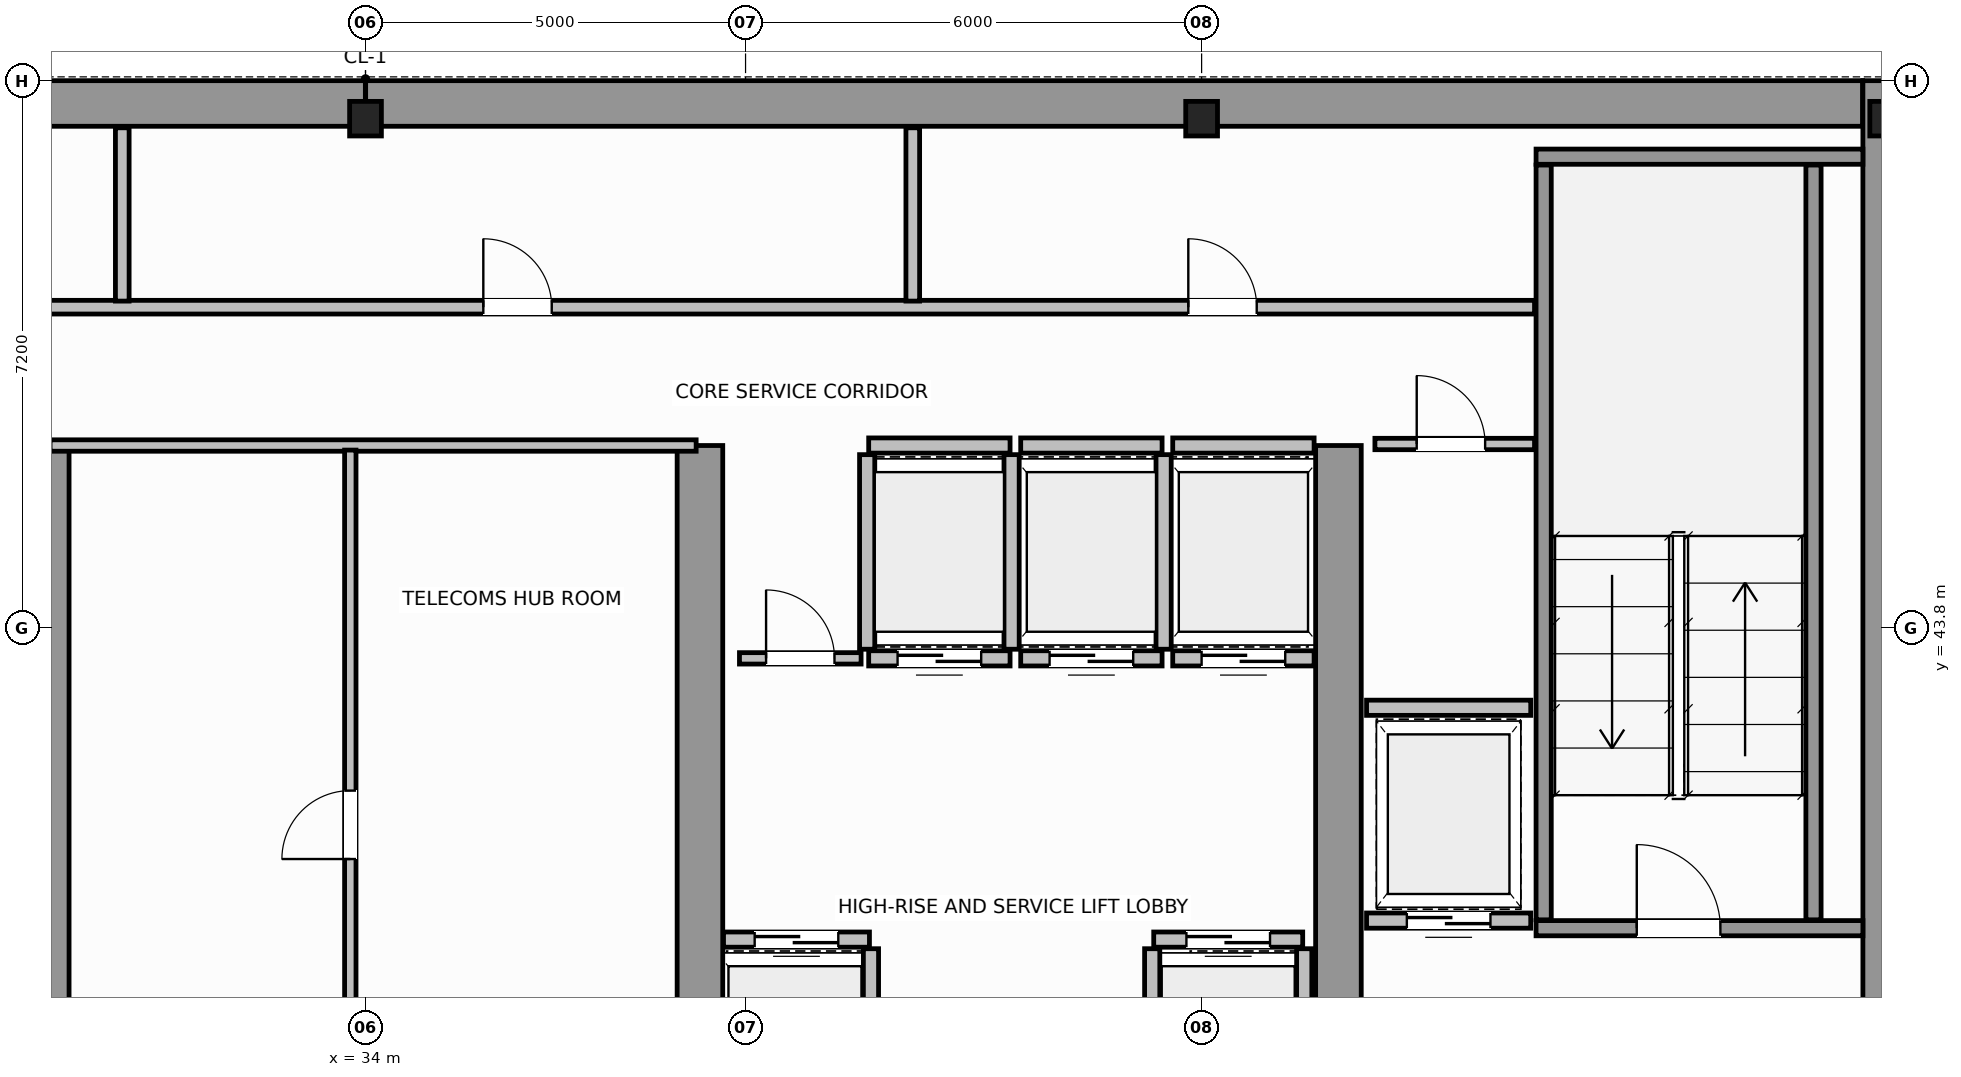
"""IFC4 building model, lengths in metres.
Left out: names, types, materials, properties, quantities, classifications, styles, units other than length and angle.
Written with IfcOpenShell. Run it as: python <this file> out.ifc"""

import sys

from ifc_helpers import new_model, si_unit, direction, frame, frame_2d, origin, origin_2d, place, context, subcontext, project, spatial, rectangle, i_section, extrude, source, transform, mapped, element, fill, save


model = new_model("IFC4")
c1 = context("Model", 3, precision=1e-05, world=origin(), true_north=direction((0.0, 1.0)))
c2 = subcontext(c1, "Body", "Model", "MODEL_VIEW")
j1 = project(units=[si_unit("LENGTHUNIT", "METRE"), si_unit("PLANEANGLEUNIT", "RADIAN")], contexts=[c1])
p1 = place(None, origin())
s1 = spatial("IfcSite", under=j1, at=p1, CompositionType="ELEMENT")
p2 = place(p1, origin())
s2 = spatial("IfcBuilding", under=s1, at=p2, CompositionType="ELEMENT")
p3 = place(p2, frame((0.0, 0.0, 223.2)))
s3 = spatial("IfcBuildingStorey", under=s2, at=p3, CompositionType="ELEMENT", Elevation=223.2)
m1 = source(origin(), c2, "Body", "SweptSolid", [
    extrude(i_section(OverallWidth=0.418, OverallDepth=0.455, WebThickness=0.042, FlangeThickness=0.058, FilletRadius=0.015, at=origin_2d()), origin(), (0.0, 0.0, 1.0), 3.8),
])
for number, where, z_axis, x_axis in (
    (1, (34.0, 50.5, 0.0), (0.0, 0.0, 1.0), (1.0, 0.0, 0.0)),
    (2, (45.0, 50.5, 0.0), (0.0, 0.0, 1.0), (1.0, 0.0, 0.0)),
    (3, (54.0, 50.5, 0.0), (0.0, 0.0, 1.0), (1.0, 0.0, 0.0)),
):
    element("IfcColumn", number, at=place(p3, frame(where, z_axis=z_axis, x_axis=x_axis)), inside=s3, PredefinedType="COLUMN", context=c2, shape_type="MappedRepresentation", body=[
        mapped(m1, transform((0.0, 0.0, 0.0), scale=1.0)),
    ])
for number, where, z_axis, x_axis in (
    (4, (14.304, 50.7, 0.0), (0.0, 0.0, 1.0), (1.0, 0.0, 0.0)),
    (5, (34.002, 50.7, 0.0), (0.0, 0.0, 1.0), (1.0, 0.0, 0.0)),
):
    element("IfcWall", number, at=place(p3, frame(where, z_axis=z_axis, x_axis=x_axis)), inside=s3, PredefinedType="SHEAR", context=c2, shape_type="SweptSolid", body=[
        extrude(rectangle(XDim=19.694, YDim=0.6, at=frame_2d((9.847, 0.0))), origin(), (0.0, 0.0, 1.0), 3.8),
    ])
p4 = place(p3, frame((54.0, 36.5, 0.0), z_axis=(0.0, 0.0, 1.0), x_axis=(0.0, 1.0, 0.0)))
e6 = element("IfcWall", 6, at=p4, inside=s3, PredefinedType="SHEAR", context=c2, shape_type="SweptSolid", body=[
    extrude(rectangle(XDim=14.5, YDim=0.6, at=frame_2d((7.25, 0.0))), origin(), (0.0, 0.0, 1.0), 3.8),
])
for number, where, z_axis, x_axis in (
    (7, (29.8, 36.82, 0.0), (0.0, 0.0, 1.0), (0.0, 1.0, 0.0)),
    (8, (38.4, 36.82, 0.0), (0.0, 0.0, 1.0), (0.0, 1.0, 0.0)),
    (9, (46.8, 36.82, 0.0), (0.0, 0.0, 1.0), (0.0, 1.0, 0.0)),
):
    element("IfcWall", number, at=place(p3, frame(where, z_axis=z_axis, x_axis=x_axis)), inside=s3, PredefinedType="SHEAR", context=c2, shape_type="SweptSolid", body=[
        extrude(rectangle(XDim=9.38, YDim=0.6, at=frame_2d((4.69, 0.0))), origin(), (0.0, 0.0, 1.0), 3.8),
    ])
p5 = place(p3, frame((49.4, 39.85, 0.0), z_axis=(0.0, 0.0, 1.0), x_axis=(1.0, 0.0, 0.0)))
e10 = element("IfcWall", 10, at=p5, inside=s3, PredefinedType="SOLIDWALL", context=c2, shape_type="SweptSolid", body=[
    extrude(rectangle(XDim=4.3, YDim=0.2, at=frame_2d((2.15, 0.0))), origin(), (0.0, 0.0, 1.0), 3.8),
])
p6 = place(p5, frame((1.325, 0.0, 0.0)))
e11 = element("IfcOpeningElement", 11, at=p6, cuts=e10, PredefinedType="OPENING", context=c2, shape_type="SweptSolid", body=[
    extrude(rectangle(XDim=1.1, YDim=2.15, at=frame_2d((0.55, 1.075))), frame((0.0, 0.11, 0.0), z_axis=(0.0, -1.0, 0.0), x_axis=(1.0, 0.0, 0.0)), (0.0, 0.0, 1.0), 0.22),
])
p7 = place(p3, frame((49.4, 50.0, 0.0), z_axis=(0.0, 0.0, 1.0), x_axis=(1.0, 0.0, 0.0)))
e12 = element("IfcWall", 12, at=p7, inside=s3, PredefinedType="SOLIDWALL", context=c2, shape_type="SweptSolid", body=[
    extrude(rectangle(XDim=4.3, YDim=0.2, at=frame_2d((2.15, 0.0))), origin(), (0.0, 0.0, 1.0), 3.8),
])
for number, where, z_axis, x_axis in (
    (13, (49.5, 39.96, 0.0), (0.0, 0.0, 1.0), (0.0, 1.0, 0.0)),
    (14, (53.05, 39.96, 0.0), (0.0, 0.0, 1.0), (0.0, 1.0, 0.0)),
):
    element("IfcWall", number, at=place(p3, frame(where, z_axis=z_axis, x_axis=x_axis)), inside=s3, PredefinedType="SOLIDWALL", context=c2, shape_type="SweptSolid", body=[
        extrude(rectangle(XDim=9.93, YDim=0.2, at=frame_2d((4.965, 0.0))), origin(), (0.0, 0.0, 1.0), 3.8),
    ])
p8 = place(p3, frame((38.71, 39.7, 0.0), z_axis=(0.0, 0.0, 1.0), x_axis=(1.0, 0.0, 0.0)))
e15 = element("IfcWall", 15, at=p8, inside=s3, PredefinedType="SOLIDWALL", context=c2, shape_type="SweptSolid", body=[
    extrude(rectangle(XDim=1.92, YDim=0.2, at=frame_2d((0.96, 0.0))), origin(), (0.0, 0.0, 1.0), 3.58),
])
p9 = place(p8, frame((0.41, 0.0, 0.0)))
e16 = element("IfcOpeningElement", 16, at=p9, cuts=e15, PredefinedType="OPENING", context=c2, shape_type="SweptSolid", body=[
    extrude(rectangle(XDim=1.1, YDim=2.15, at=frame_2d((0.55, 1.075))), frame((0.0, 0.11, 0.0), z_axis=(0.0, -1.0, 0.0), x_axis=(1.0, 0.0, 0.0)), (0.0, 0.0, 1.0), 0.22),
])
p10 = place(p3, frame((40.65, 37.02, 0.0), z_axis=(0.0, 0.0, 1.0), x_axis=(0.0, 1.0, 0.0)))
e17 = element("IfcWall", 17, at=p10, inside=s3, PredefinedType="SOLIDWALL", context=c2, shape_type="SweptSolid", body=[
    extrude(rectangle(XDim=2.56, YDim=0.2, at=frame_2d((1.28, 0.0))), origin(), (0.0, 0.0, 1.0), 3.58),
])
p11 = place(p3, frame((44.37, 39.7, 0.0), z_axis=(0.0, 0.0, 1.0), x_axis=(1.0, 0.0, 0.0)))
e18 = element("IfcWall", 18, at=p11, inside=s3, PredefinedType="SOLIDWALL", context=c2, shape_type="SweptSolid", body=[
    extrude(rectangle(XDim=1.96, YDim=0.2, at=frame_2d((0.98, 0.0))), origin(), (0.0, 0.0, 1.0), 3.58),
])
p12 = place(p11, frame((0.43, 0.0, 0.0)))
e19 = element("IfcOpeningElement", 19, at=p12, cuts=e18, PredefinedType="OPENING", context=c2, shape_type="SweptSolid", body=[
    extrude(rectangle(XDim=1.1, YDim=2.15, at=frame_2d((0.55, 1.075))), frame((0.0, 0.11, 0.0), z_axis=(0.0, -1.0, 0.0), x_axis=(1.0, 0.0, 0.0)), (0.0, 0.0, 1.0), 0.22),
])
for number, where, z_axis, x_axis in (
    (20, (44.35, 37.02, 0.0), (0.0, 0.0, 1.0), (0.0, 1.0, 0.0)),
    (21, (46.35, 37.02, 0.0), (0.0, 0.0, 1.0), (0.0, 1.0, 0.0)),
):
    element("IfcWall", number, at=place(p3, frame(where, z_axis=z_axis, x_axis=x_axis)), inside=s3, PredefinedType="SOLIDWALL", context=c2, shape_type="SweptSolid", body=[
        extrude(rectangle(XDim=2.56, YDim=0.2, at=frame_2d((1.28, 0.0))), origin(), (0.0, 0.0, 1.0), 3.58),
    ])
p13 = place(p3, frame((40.62, 43.4, 0.0), z_axis=(0.0, 0.0, 1.0), x_axis=(1.0, 0.0, 0.0)))
e22 = element("IfcWall", 22, at=p13, inside=s3, PredefinedType="SOLIDWALL", context=c2, shape_type="SweptSolid", body=[
    extrude(rectangle(XDim=1.86, YDim=0.2, at=frame_2d((0.93, 0.0))), origin(), (0.0, 0.0, 1.0), 3.58),
])
p14 = place(p13, frame((0.38, 0.0, 0.0)))
e23 = element("IfcOpeningElement", 23, at=p14, cuts=e22, PredefinedType="OPENING", context=c2, shape_type="SweptSolid", body=[
    extrude(rectangle(XDim=1.1, YDim=2.15, at=frame_2d((0.55, 1.075))), frame((0.0, 0.11, 0.0), z_axis=(0.0, -1.0, 0.0), x_axis=(1.0, 0.0, 0.0)), (0.0, 0.0, 1.0), 0.22),
])
p15 = place(p3, frame((40.62, 46.2, 0.0), z_axis=(0.0, 0.0, 1.0), x_axis=(1.0, 0.0, 0.0)))
e24 = element("IfcWall", 24, at=p15, inside=s3, PredefinedType="SOLIDWALL", context=c2, shape_type="SweptSolid", body=[
    extrude(rectangle(XDim=1.86, YDim=0.2, at=frame_2d((0.93, 0.0))), origin(), (0.0, 0.0, 1.0), 3.58),
])
for number, where, z_axis, x_axis in (
    (25, (40.6, 43.52, 0.0), (0.0, 0.0, 1.0), (0.0, 1.0, 0.0)),
    (26, (42.5, 43.52, 0.0), (0.0, 0.0, 1.0), (0.0, 1.0, 0.0)),
):
    element("IfcWall", number, at=place(p3, frame(where, z_axis=z_axis, x_axis=x_axis)), inside=s3, PredefinedType="SOLIDWALL", context=c2, shape_type="SweptSolid", body=[
        extrude(rectangle(XDim=2.56, YDim=0.2, at=frame_2d((1.28, 0.0))), origin(), (0.0, 0.0, 1.0), 3.58),
    ])
p16 = place(p3, frame((42.62, 43.4, 0.0), z_axis=(0.0, 0.0, 1.0), x_axis=(1.0, 0.0, 0.0)))
e27 = element("IfcWall", 27, at=p16, inside=s3, PredefinedType="SOLIDWALL", context=c2, shape_type="SweptSolid", body=[
    extrude(rectangle(XDim=1.86, YDim=0.2, at=frame_2d((0.93, 0.0))), origin(), (0.0, 0.0, 1.0), 3.58),
])
p17 = place(p16, frame((0.38, 0.0, 0.0)))
e28 = element("IfcOpeningElement", 28, at=p17, cuts=e27, PredefinedType="OPENING", context=c2, shape_type="SweptSolid", body=[
    extrude(rectangle(XDim=1.1, YDim=2.15, at=frame_2d((0.55, 1.075))), frame((0.0, 0.11, 0.0), z_axis=(0.0, -1.0, 0.0), x_axis=(1.0, 0.0, 0.0)), (0.0, 0.0, 1.0), 0.22),
])
p18 = place(p3, frame((42.62, 46.2, 0.0), z_axis=(0.0, 0.0, 1.0), x_axis=(1.0, 0.0, 0.0)))
e29 = element("IfcWall", 29, at=p18, inside=s3, PredefinedType="SOLIDWALL", context=c2, shape_type="SweptSolid", body=[
    extrude(rectangle(XDim=1.86, YDim=0.2, at=frame_2d((0.93, 0.0))), origin(), (0.0, 0.0, 1.0), 3.58),
])
p19 = place(p3, frame((44.5, 43.52, 0.0), z_axis=(0.0, 0.0, 1.0), x_axis=(0.0, 1.0, 0.0)))
e30 = element("IfcWall", 30, at=p19, inside=s3, PredefinedType="SOLIDWALL", context=c2, shape_type="SweptSolid", body=[
    extrude(rectangle(XDim=2.56, YDim=0.2, at=frame_2d((1.28, 0.0))), origin(), (0.0, 0.0, 1.0), 3.58),
])
p20 = place(p3, frame((44.62, 43.4, 0.0), z_axis=(0.0, 0.0, 1.0), x_axis=(1.0, 0.0, 0.0)))
e31 = element("IfcWall", 31, at=p20, inside=s3, PredefinedType="SOLIDWALL", context=c2, shape_type="SweptSolid", body=[
    extrude(rectangle(XDim=1.86, YDim=0.2, at=frame_2d((0.93, 0.0))), origin(), (0.0, 0.0, 1.0), 3.58),
])
p21 = place(p20, frame((0.38, 0.0, 0.0)))
e32 = element("IfcOpeningElement", 32, at=p21, cuts=e31, PredefinedType="OPENING", context=c2, shape_type="SweptSolid", body=[
    extrude(rectangle(XDim=1.1, YDim=2.15, at=frame_2d((0.55, 1.075))), frame((0.0, 0.11, 0.0), z_axis=(0.0, -1.0, 0.0), x_axis=(1.0, 0.0, 0.0)), (0.0, 0.0, 1.0), 0.22),
])
p22 = place(p3, frame((44.62, 46.2, 0.0), z_axis=(0.0, 0.0, 1.0), x_axis=(1.0, 0.0, 0.0)))
e33 = element("IfcWall", 33, at=p22, inside=s3, PredefinedType="SOLIDWALL", context=c2, shape_type="SweptSolid", body=[
    extrude(rectangle(XDim=1.86, YDim=0.2, at=frame_2d((0.93, 0.0))), origin(), (0.0, 0.0, 1.0), 3.58),
])
p23 = place(p3, frame((47.17, 39.95, 0.0), z_axis=(0.0, 0.0, 1.0), x_axis=(1.0, 0.0, 0.0)))
e34 = element("IfcWall", 34, at=p23, inside=s3, PredefinedType="SOLIDWALL", context=c2, shape_type="SweptSolid", body=[
    extrude(rectangle(XDim=2.16, YDim=0.2, at=frame_2d((1.08, 0.0))), origin(), (0.0, 0.0, 1.0), 3.58),
])
p24 = place(p23, frame((0.53, 0.0, 0.0)))
e35 = element("IfcOpeningElement", 35, at=p24, cuts=e34, PredefinedType="OPENING", context=c2, shape_type="SweptSolid", body=[
    extrude(rectangle(XDim=1.1, YDim=2.15, at=frame_2d((0.55, 1.075))), frame((0.0, 0.11, 0.0), z_axis=(0.0, -1.0, 0.0), x_axis=(1.0, 0.0, 0.0)), (0.0, 0.0, 1.0), 0.22),
])
p25 = place(p3, frame((47.17, 42.75, 0.0), z_axis=(0.0, 0.0, 1.0), x_axis=(1.0, 0.0, 0.0)))
e36 = element("IfcWall", 36, at=p25, inside=s3, PredefinedType="SOLIDWALL", context=c2, shape_type="SweptSolid", body=[
    extrude(rectangle(XDim=2.16, YDim=0.2, at=frame_2d((1.08, 0.0))), origin(), (0.0, 0.0, 1.0), 3.58),
])
p26 = place(p3, frame((29.85, 46.2, 0.0), z_axis=(0.0, 0.0, 1.0), x_axis=(1.0, 0.0, 0.0)))
e37 = element("IfcWall", 37, at=p26, inside=s3, PredefinedType="PARTITIONING", context=c2, shape_type="SweptSolid", body=[
    extrude(rectangle(XDim=8.5, YDim=0.15, at=frame_2d((4.25, 0.0))), origin(), (0.0, 0.0, 1.0), 3.58),
])
p27 = place(p3, frame((33.8, 36.56, 0.0), z_axis=(0.0, 0.0, 1.0), x_axis=(0.0, 1.0, 0.0)))
e38 = element("IfcWall", 38, at=p27, inside=s3, PredefinedType="PARTITIONING", context=c2, shape_type="SweptSolid", body=[
    extrude(rectangle(XDim=9.58, YDim=0.15, at=frame_2d((4.79, 0.0))), origin(), (0.0, 0.0, 1.0), 3.58),
])
p28 = place(p27, frame((4.2, 0.0, 0.0)))
e39 = element("IfcOpeningElement", 39, at=p28, cuts=e38, PredefinedType="OPENING", context=c2, shape_type="SweptSolid", body=[
    extrude(rectangle(XDim=0.9, YDim=2.1, at=frame_2d((0.45, 1.05))), frame((0.0, 0.085, 0.0), z_axis=(0.0, -1.0, 0.0), x_axis=(1.0, 0.0, 0.0)), (0.0, 0.0, 1.0), 0.17),
])
p29 = place(p3, frame((47.28, 46.22, 0.0), z_axis=(0.0, 0.0, 1.0), x_axis=(1.0, 0.0, 0.0)))
e40 = element("IfcWall", 40, at=p29, inside=s3, PredefinedType="PARTITIONING", context=c2, shape_type="SweptSolid", body=[
    extrude(rectangle(XDim=2.1, YDim=0.15, at=frame_2d((1.05, 0.0))), origin(), (0.0, 0.0, 1.0), 3.58),
])
p30 = place(p29, frame((0.55, 0.0, 0.0)))
e41 = element("IfcOpeningElement", 41, at=p30, cuts=e40, PredefinedType="OPENING", context=c2, shape_type="SweptSolid", body=[
    extrude(rectangle(XDim=0.9, YDim=2.1, at=frame_2d((0.45, 1.05))), frame((0.0, 0.085, 0.0), z_axis=(0.0, -1.0, 0.0), x_axis=(1.0, 0.0, 0.0)), (0.0, 0.0, 1.0), 0.17),
])
p31 = place(p3, frame((38.92, 43.4, 0.0), z_axis=(0.0, 0.0, 1.0), x_axis=(1.0, 0.0, 0.0)))
e42 = element("IfcWall", 42, at=p31, inside=s3, PredefinedType="PARTITIONING", context=c2, shape_type="SweptSolid", body=[
    extrude(rectangle(XDim=1.6, YDim=0.15, at=frame_2d((0.8, 0.0))), origin(), (0.0, 0.0, 1.0), 3.58),
])
p32 = place(p31, frame((0.35, 0.0, 0.0)))
e43 = element("IfcOpeningElement", 43, at=p32, cuts=e42, PredefinedType="OPENING", context=c2, shape_type="SweptSolid", body=[
    extrude(rectangle(XDim=0.9, YDim=2.1, at=frame_2d((0.45, 1.05))), frame((0.0, 0.085, 0.0), z_axis=(0.0, -1.0, 0.0), x_axis=(1.0, 0.0, 0.0)), (0.0, 0.0, 1.0), 0.17),
])
p33 = place(p3, frame((18.62, 48.02, 0.0), z_axis=(0.0, 0.0, 1.0), x_axis=(1.0, 0.0, 0.0)))
e44 = element("IfcWall", 44, at=p33, inside=s3, PredefinedType="PLUMBINGWALL", context=c2, shape_type="SweptSolid", body=[
    extrude(rectangle(XDim=30.76, YDim=0.18, at=frame_2d((15.38, 0.0))), origin(), (0.0, 0.0, 1.0), 3.58),
])
p34 = place(p33, frame((1.955, 0.0, 0.0)))
e45 = element("IfcOpeningElement", 45, at=p34, cuts=e44, PredefinedType="OPENING", context=c2, shape_type="SweptSolid", body=[
    extrude(rectangle(XDim=0.9, YDim=2.15, at=frame_2d((0.45, 1.075))), frame((0.0, 0.1, 0.0), z_axis=(0.0, -1.0, 0.0), x_axis=(1.0, 0.0, 0.0)), (0.0, 0.0, 1.0), 0.2),
])
p35 = place(p33, frame((8.03, 0.0, 0.0)))
e46 = element("IfcOpeningElement", 46, at=p35, cuts=e44, PredefinedType="OPENING", context=c2, shape_type="SweptSolid", body=[
    extrude(rectangle(XDim=0.9, YDim=2.15, at=frame_2d((0.45, 1.075))), frame((0.0, 0.1, 0.0), z_axis=(0.0, -1.0, 0.0), x_axis=(1.0, 0.0, 0.0)), (0.0, 0.0, 1.0), 0.2),
])
p36 = place(p33, frame((16.93, 0.0, 0.0)))
e47 = element("IfcOpeningElement", 47, at=p36, cuts=e44, PredefinedType="OPENING", context=c2, shape_type="SweptSolid", body=[
    extrude(rectangle(XDim=0.9, YDim=2.15, at=frame_2d((0.45, 1.075))), frame((0.0, 0.1, 0.0), z_axis=(0.0, -1.0, 0.0), x_axis=(1.0, 0.0, 0.0)), (0.0, 0.0, 1.0), 0.2),
])
p37 = place(p33, frame((26.205, 0.0, 0.0)))
e48 = element("IfcOpeningElement", 48, at=p37, cuts=e44, PredefinedType="OPENING", context=c2, shape_type="SweptSolid", body=[
    extrude(rectangle(XDim=0.9, YDim=2.15, at=frame_2d((0.45, 1.075))), frame((0.0, 0.1, 0.0), z_axis=(0.0, -1.0, 0.0), x_axis=(1.0, 0.0, 0.0)), (0.0, 0.0, 1.0), 0.2),
])
for number, where, z_axis, x_axis in (
    (49, (30.8, 48.1, 0.0), (0.0, 0.0, 1.0), (0.0, 1.0, 0.0)),
    (50, (41.2, 48.1, 0.0), (0.0, 0.0, 1.0), (0.0, 1.0, 0.0)),
):
    element("IfcWall", number, at=place(p3, frame(where, z_axis=z_axis, x_axis=x_axis)), inside=s3, PredefinedType="PLUMBINGWALL", context=c2, shape_type="SweptSolid", body=[
        extrude(rectangle(XDim=2.28, YDim=0.18, at=frame_2d((1.14, 0.0))), origin(), (0.0, 0.0, 1.0), 3.58),
    ])
m2 = source(origin(), c2, "Body", "SweptSolid", [
    extrude(rectangle(XDim=1.1, YDim=2.15, at=frame_2d((0.55, 1.075))), frame((0.0, 0.025, 0.0), z_axis=(0.0, -1.0, 0.0), x_axis=(1.0, 0.0, 0.0)), (0.0, 0.0, 1.0), 0.05),
])
p38 = place(p6, origin())
e51 = element("IfcDoor", 51, at=p38, inside=s3, OperationType="SINGLE_SWING_RIGHT", PredefinedType="DOOR", context=c2, shape_type="MappedRepresentation", body=[
    mapped(m2, transform((0.0, 0.0, 0.0), scale=1.0)),
])
fill(e11, e51)
p39 = place(p9, origin())
e52 = element("IfcDoor", 52, at=p39, inside=s3, OperationType="DOUBLE_DOOR_SLIDING", PredefinedType="DOOR", context=c2, shape_type="MappedRepresentation", body=[
    mapped(m2, transform((0.0, 0.0, 0.0), scale=1.0)),
])
fill(e16, e52)
p40 = place(p12, origin())
e53 = element("IfcDoor", 53, at=p40, inside=s3, OperationType="DOUBLE_DOOR_SLIDING", PredefinedType="DOOR", context=c2, shape_type="MappedRepresentation", body=[
    mapped(m2, transform((0.0, 0.0, 0.0), scale=1.0)),
])
fill(e19, e53)
p41 = place(p14, origin())
e54 = element("IfcDoor", 54, at=p41, inside=s3, OperationType="DOUBLE_DOOR_SLIDING", PredefinedType="DOOR", context=c2, shape_type="MappedRepresentation", body=[
    mapped(m2, transform((0.0, 0.0, 0.0), scale=1.0)),
])
fill(e23, e54)
p42 = place(p17, origin())
e55 = element("IfcDoor", 55, at=p42, inside=s3, OperationType="DOUBLE_DOOR_SLIDING", PredefinedType="DOOR", context=c2, shape_type="MappedRepresentation", body=[
    mapped(m2, transform((0.0, 0.0, 0.0), scale=1.0)),
])
fill(e28, e55)
p43 = place(p21, origin())
e56 = element("IfcDoor", 56, at=p43, inside=s3, OperationType="DOUBLE_DOOR_SLIDING", PredefinedType="DOOR", context=c2, shape_type="MappedRepresentation", body=[
    mapped(m2, transform((0.0, 0.0, 0.0), scale=1.0)),
])
fill(e32, e56)
p44 = place(p24, origin())
e57 = element("IfcDoor", 57, at=p44, inside=s3, OperationType="DOUBLE_DOOR_SLIDING", PredefinedType="DOOR", context=c2, shape_type="MappedRepresentation", body=[
    mapped(m2, transform((0.0, 0.0, 0.0), scale=1.0)),
])
fill(e35, e57)
m3 = source(origin(), c2, "Body", "SweptSolid", [
    extrude(rectangle(XDim=0.9, YDim=2.1, at=frame_2d((0.45, 1.05))), frame((0.0, 0.025, 0.0), z_axis=(0.0, -1.0, 0.0), x_axis=(1.0, 0.0, 0.0)), (0.0, 0.0, 1.0), 0.05),
])
p45 = place(p28, origin())
e58 = element("IfcDoor", 58, at=p45, inside=s3, OperationType="SINGLE_SWING_RIGHT", PredefinedType="DOOR", context=c2, shape_type="MappedRepresentation", body=[
    mapped(m3, transform((0.0, 0.0, 0.0), scale=1.0)),
])
fill(e39, e58)
p46 = place(p30, origin())
e59 = element("IfcDoor", 59, at=p46, inside=s3, OperationType="SINGLE_SWING_RIGHT", PredefinedType="DOOR", context=c2, shape_type="MappedRepresentation", body=[
    mapped(m3, transform((0.0, 0.0, 0.0), scale=1.0)),
])
fill(e41, e59)
p47 = place(p32, origin())
e60 = element("IfcDoor", 60, at=p47, inside=s3, OperationType="SINGLE_SWING_LEFT", PredefinedType="DOOR", context=c2, shape_type="MappedRepresentation", body=[
    mapped(m3, transform((0.0, 0.0, 0.0), scale=1.0)),
])
fill(e43, e60)
m4 = source(origin(), c2, "Body", "SweptSolid", [
    extrude(rectangle(XDim=0.9, YDim=2.15, at=frame_2d((0.45, 1.075))), frame((0.0, 0.025, 0.0), z_axis=(0.0, -1.0, 0.0), x_axis=(1.0, 0.0, 0.0)), (0.0, 0.0, 1.0), 0.05),
])
p48 = place(p36, origin())
e61 = element("IfcDoor", 61, at=p48, inside=s3, OperationType="SINGLE_SWING_LEFT", PredefinedType="DOOR", context=c2, shape_type="MappedRepresentation", body=[
    mapped(m4, transform((0.0, 0.0, 0.0), scale=1.0)),
])
fill(e47, e61)
p49 = place(p37, origin())
e62 = element("IfcDoor", 62, at=p49, inside=s3, OperationType="SINGLE_SWING_RIGHT", PredefinedType="DOOR", context=c2, shape_type="MappedRepresentation", body=[
    mapped(m4, transform((0.0, 0.0, 0.0), scale=1.0)),
])
fill(e48, e62)
save(model, sys.argv[1])
